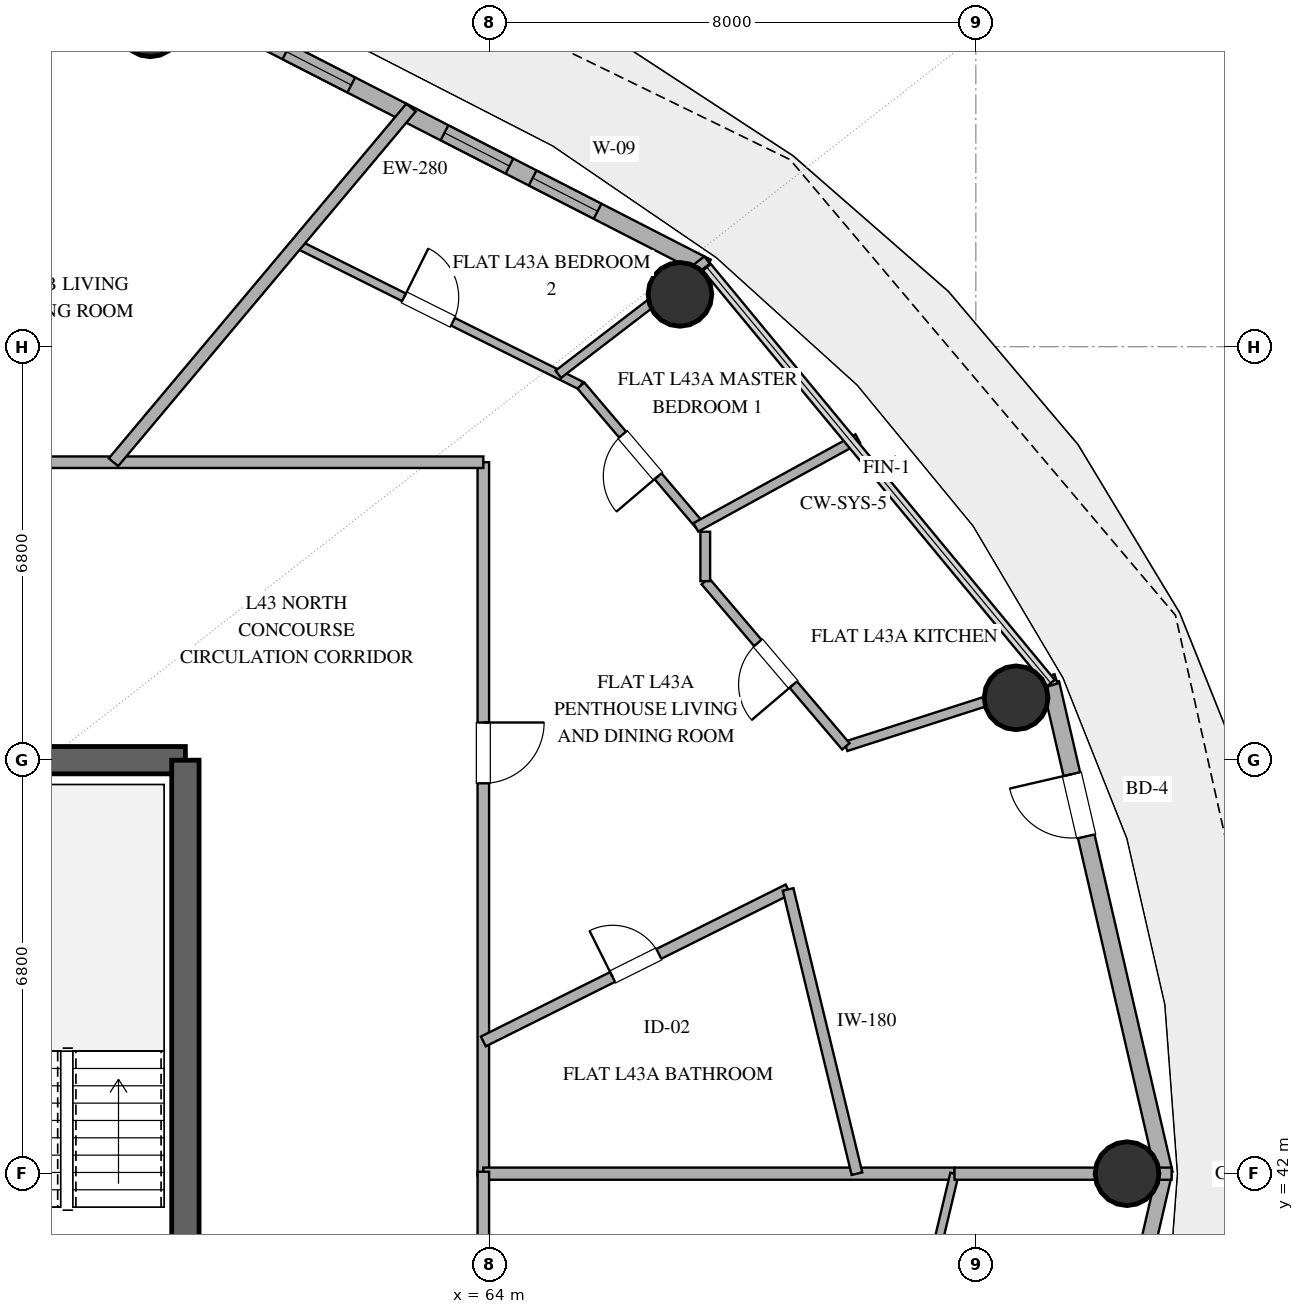
"""IFC4 building model, lengths in metres.
Left out: names, types, materials, properties, quantities, classifications, styles, units other than length and angle.
Written with IfcOpenShell. Run it as: python <this file> out.ifc"""

import sys

from ifc_helpers import new_model, si_unit, direction, frame, frame_2d, origin, origin_2d, place, context, subcontext, project, spatial, rectangle, hollow_circle, extrude, element, fill, save


model = new_model("IFC4")
c1 = context("Model", 3, precision=1e-05, world=origin(), true_north=direction((0.0, 1.0)))
c2 = subcontext(c1, "Body", "Model", "MODEL_VIEW")
j1 = project(units=[si_unit("LENGTHUNIT", "METRE"), si_unit("PLANEANGLEUNIT", "RADIAN")], contexts=[c1])
p1 = place(None, origin())
s1 = spatial("IfcSite", under=j1, at=p1, CompositionType="ELEMENT")
p2 = place(p1, origin())
s2 = spatial("IfcBuilding", under=s1, at=p2, CompositionType="ELEMENT")
p3 = place(p2, frame((0.0, 0.0, 172.2)))
s3 = spatial("IfcBuildingStorey", under=s2, at=p3, CompositionType="ELEMENT", Elevation=172.2)
p4 = place(p3, frame((55.0, 48.8, 0.0), z_axis=(0.0, 0.0, 1.0), x_axis=(1.0, 0.0, 0.0)))
e1 = element("IfcWall", 1, at=p4, inside=s3, PredefinedType="SHEAR", context=c2, shape_type="SweptSolid", body=[
    extrude(rectangle(XDim=4.0, YDim=0.45, at=frame_2d((2.0, 0.0))), origin(), (0.0, 0.0, 1.0), 3.38),
])
p5 = place(p3, frame((59.0, 35.2, 0.0), z_axis=(0.0, 0.0, 1.0), x_axis=(0.0, 1.0, 0.0)))
e2 = element("IfcWall", 2, at=p5, inside=s3, PredefinedType="SHEAR", context=c2, shape_type="SweptSolid", body=[
    extrude(rectangle(XDim=13.6, YDim=0.45, at=frame_2d((6.8, 0.0))), origin(), (0.0, 0.0, 1.0), 3.38),
])
for number, where, z_axis, x_axis in (
    (3, (74.487, 42.0, 0.0), (0.0, 0.0, 1.0), (1.0, 0.0, 0.0)),
    (4, (72.662, 49.826, 0.0), (0.0, 0.0, 1.0), (1.0, 0.0, 0.0)),
    (5, (67.134, 56.46, 0.0), (0.0, 0.0, 1.0), (1.0, 0.0, 0.0)),
    (6, (58.422, 60.893, 0.0), (0.0, 0.0, 1.0), (1.0, 0.0, 0.0)),
):
    element("IfcColumn", number, at=place(p3, frame(where, z_axis=z_axis, x_axis=x_axis)), inside=s3, PredefinedType="COLUMN", context=c2, shape_type="SweptSolid", body=[
        extrude(hollow_circle(Radius=0.525, WallThickness=0.028, at=origin_2d()), origin(), (0.0, 0.0, 1.0), 3.38),
    ])
p6 = place(p3, frame((75.099, 42.0, 0.0), z_axis=(0.0, 0.0, 1.0), x_axis=(-0.225473184558, 0.974249374157, 0.0)))
e7 = element("IfcWall", 7, at=p6, inside=s3, PredefinedType="SOLIDWALL", context=c2, shape_type="SweptSolid", body=[
    extrude(rectangle(XDim=8.28, YDim=0.28, at=frame_2d((4.14, 0.0))), origin(), (0.0, 0.0, 1.0), 3.38),
])
p7 = place(p6, frame((5.694, 0.0, 0.0)))
e8 = element("IfcOpeningElement", 8, at=p7, cuts=e7, PredefinedType="OPENING", context=c2, shape_type="SweptSolid", body=[
    extrude(rectangle(XDim=1.05, YDim=2.2, at=frame_2d((0.525, 1.1))), frame((0.0, 0.15, 0.0), z_axis=(0.0, -1.0, 0.0), x_axis=(1.0, 0.0, 0.0)), (0.0, 0.0, 1.0), 0.3),
])
p8 = place(p3, frame((67.576, 56.906, 0.0), z_axis=(0.0, 0.0, 1.0), x_axis=(-0.889872523182, 0.456209263919, 0.0)))
e9 = element("IfcWall", 9, at=p8, inside=s3, PredefinedType="SOLIDWALL", context=c2, shape_type="SweptSolid", body=[
    extrude(rectangle(XDim=10.016, YDim=0.28, at=frame_2d((5.008, 0.0))), origin(), (0.0, 0.0, 1.0), 3.38),
])
p9 = place(p8, frame((2.019, 0.0, 0.85)))
e10 = element("IfcOpeningElement", 10, at=p9, cuts=e9, PredefinedType="OPENING", context=c2, shape_type="SweptSolid", body=[
    extrude(rectangle(XDim=1.2, YDim=1.8, at=frame_2d((0.6, 0.9))), frame((0.0, 0.15, 0.0), z_axis=(0.0, -1.0, 0.0), x_axis=(1.0, 0.0, 0.0)), (0.0, 0.0, 1.0), 0.3),
])
p10 = place(p8, frame((3.648, 0.0, 0.85)))
e11 = element("IfcOpeningElement", 11, at=p10, cuts=e9, PredefinedType="OPENING", context=c2, shape_type="SweptSolid", body=[
    extrude(rectangle(XDim=1.2, YDim=1.8, at=frame_2d((0.6, 0.9))), frame((0.0, 0.15, 0.0), z_axis=(0.0, -1.0, 0.0), x_axis=(1.0, 0.0, 0.0)), (0.0, 0.0, 1.0), 0.3),
])
p11 = place(p8, frame((6.571, 0.0, 0.85)))
e12 = element("IfcOpeningElement", 12, at=p11, cuts=e9, PredefinedType="OPENING", context=c2, shape_type="SweptSolid", body=[
    extrude(rectangle(XDim=1.2, YDim=1.6, at=frame_2d((0.6, 0.8))), frame((0.0, 0.15, 0.0), z_axis=(0.0, -1.0, 0.0), x_axis=(1.0, 0.0, 0.0)), (0.0, 0.0, 1.0), 0.3),
])
p12 = place(p3, frame((73.232, 33.933, 0.0), z_axis=(0.0, 0.0, 1.0), x_axis=(0.225473184558, 0.974249374157, 0.0)))
e13 = element("IfcWall", 13, at=p12, inside=s3, PredefinedType="SOLIDWALL", context=c2, shape_type="SweptSolid", body=[
    extrude(rectangle(XDim=8.28, YDim=0.25, at=frame_2d((4.14, 0.0))), origin(), (0.0, 0.0, 1.0), 3.38),
])
p13 = place(p12, frame((5.481, 0.0, 1.42)))
e14 = element("IfcOpeningElement", 14, at=p13, cuts=e13, PredefinedType="OPENING", context=c2, shape_type="SweptSolid", body=[
    extrude(rectangle(XDim=1.0, YDim=1.05, at=frame_2d((0.5, 0.525))), frame((0.0, 0.135, 0.0), z_axis=(0.0, -1.0, 0.0), x_axis=(1.0, 0.0, 0.0)), (0.0, 0.0, 1.0), 0.27),
])
p14 = place(p3, frame((63.9, 53.7, 0.0), z_axis=(0.0, 0.0, 1.0), x_axis=(0.0, -1.0, 0.0)))
e15 = element("IfcWall", 15, at=p14, inside=s3, PredefinedType="PARTITIONING", context=c2, shape_type="SweptSolid", body=[
    extrude(rectangle(XDim=11.732, YDim=0.19, at=frame_2d((5.866, 0.0))), origin(), (0.0, 0.0, 1.0), 2.74),
])
p15 = place(p14, frame((4.281, 0.0, 0.0)))
e16 = element("IfcOpeningElement", 16, at=p15, cuts=e15, PredefinedType="OPENING", context=c2, shape_type="SweptSolid", body=[
    extrude(rectangle(XDim=1.0, YDim=2.2, at=frame_2d((0.5, 1.1))), frame((0.0, 0.105, 0.0), z_axis=(0.0, -1.0, 0.0), x_axis=(1.0, 0.0, 0.0)), (0.0, 0.0, 1.0), 0.21),
])
p16 = place(p3, frame((48.092, 53.7, 0.0), z_axis=(0.0, 0.0, 1.0), x_axis=(1.0, 0.0, 0.0)))
e17 = element("IfcWall", 17, at=p16, inside=s3, PredefinedType="PARTITIONING", context=c2, shape_type="SweptSolid", body=[
    extrude(rectangle(XDim=15.808, YDim=0.19, at=frame_2d((7.904, 0.0))), origin(), (0.0, 0.0, 1.0), 2.74),
])
p17 = place(p16, frame((6.109, 0.0, 0.0)))
e18 = element("IfcOpeningElement", 18, at=p17, cuts=e17, PredefinedType="OPENING", context=c2, shape_type="SweptSolid", body=[
    extrude(rectangle(XDim=1.0, YDim=2.2, at=frame_2d((0.5, 1.1))), frame((0.0, 0.105, 0.0), z_axis=(0.0, -1.0, 0.0), x_axis=(1.0, 0.0, 0.0)), (0.0, 0.0, 1.0), 0.21),
])
p18 = place(p3, frame((63.9, 42.0, 0.0), z_axis=(0.0, 0.0, 1.0), x_axis=(1.0, 0.0, 0.0)))
e19 = element("IfcWall", 19, at=p18, inside=s3, PredefinedType="PARTITIONING", context=c2, shape_type="SweptSolid", body=[
    extrude(rectangle(XDim=7.749, YDim=0.2, at=frame_2d((3.875, 0.0))), origin(), (0.0, 0.0, 1.0), 2.74),
])
p19 = place(p3, frame((63.9, 42.032, 0.0), z_axis=(0.0, 0.0, 1.0), x_axis=(0.0, -1.0, 0.0)))
e20 = element("IfcWall", 20, at=p19, inside=s3, PredefinedType="PARTITIONING", context=c2, shape_type="SweptSolid", body=[
    extrude(rectangle(XDim=11.732, YDim=0.19, at=frame_2d((5.866, 0.0))), origin(), (0.0, 0.0, 1.0), 2.74),
])
p20 = place(p3, frame((71.649, 42.0, 0.0), z_axis=(0.0, 0.0, 1.0), x_axis=(-0.231658068135, -0.972797275627, 0.0)))
e21 = element("IfcWall", 21, at=p20, inside=s3, PredefinedType="PARTITIONING", context=c2, shape_type="SweptSolid", body=[
    extrude(rectangle(XDim=7.034, YDim=0.14, at=frame_2d((3.517, 0.0))), origin(), (0.0, 0.0, 1.0), 2.74),
])
p21 = place(p20, frame((2.427, 0.0, 0.0)))
e22 = element("IfcOpeningElement", 22, at=p21, cuts=e21, PredefinedType="OPENING", context=c2, shape_type="SweptSolid", body=[
    extrude(rectangle(XDim=0.9, YDim=2.1, at=frame_2d((0.45, 1.05))), frame((0.0, 0.08, 0.0), z_axis=(0.0, -1.0, 0.0), x_axis=(1.0, 0.0, 0.0)), (0.0, 0.0, 1.0), 0.16),
])
p22 = place(p3, frame((63.9, 44.175, 0.0), z_axis=(0.0, 0.0, 1.0), x_axis=(0.894853920946, 0.446359115699, 0.0)))
e23 = element("IfcWall", 23, at=p22, inside=s3, PredefinedType="PLUMBINGWALL", context=c2, shape_type="SweptSolid", body=[
    extrude(rectangle(XDim=5.601, YDim=0.18, at=frame_2d((2.801, 0.0))), origin(), (0.0, 0.0, 1.0), 2.74),
])
p23 = place(p22, frame((2.375, 0.0, 0.0)))
e24 = element("IfcOpeningElement", 24, at=p23, cuts=e23, PredefinedType="OPENING", context=c2, shape_type="SweptSolid", body=[
    extrude(rectangle(XDim=0.85, YDim=2.1, at=frame_2d((0.425, 1.05))), frame((0.0, 0.1, 0.0), z_axis=(0.0, -1.0, 0.0), x_axis=(1.0, 0.0, 0.0)), (0.0, 0.0, 1.0), 0.2),
])
p24 = place(p3, frame((60.831, 57.291, 0.0), z_axis=(0.0, 0.0, 1.0), x_axis=(0.894950159382, -0.446166126261, 0.0)))
e25 = element("IfcWall", 25, at=p24, inside=s3, PredefinedType="PARTITIONING", context=c2, shape_type="SweptSolid", body=[
    extrude(rectangle(XDim=5.222, YDim=0.14, at=frame_2d((2.611, 0.0))), origin(), (0.0, 0.0, 1.0), 2.74),
])
p25 = place(p24, frame((1.971, 0.0, 0.0)))
e26 = element("IfcOpeningElement", 26, at=p25, cuts=e25, PredefinedType="OPENING", context=c2, shape_type="SweptSolid", body=[
    extrude(rectangle(XDim=0.9, YDim=2.1, at=frame_2d((0.45, 1.05))), frame((0.0, 0.08, 0.0), z_axis=(0.0, -1.0, 0.0), x_axis=(1.0, 0.0, 0.0)), (0.0, 0.0, 1.0), 0.16),
])
p26 = place(p3, frame((68.912, 46.675, 0.0), z_axis=(0.0, 0.0, 1.0), x_axis=(0.235459111302, -0.97188425592, 0.0)))
e27 = element("IfcWall", 27, at=p26, inside=s3, PredefinedType="PLUMBINGWALL", context=c2, shape_type="SweptSolid", body=[
    extrude(rectangle(XDim=4.81, YDim=0.18, at=frame_2d((2.405, 0.0))), origin(), (0.0, 0.0, 1.0), 2.74),
])
p27 = place(p3, frame((62.711, 59.531, 0.0), z_axis=(0.0, 0.0, 1.0), x_axis=(-0.642792619699, -0.766040239192, 0.0)))
e28 = element("IfcWall", 28, at=p27, inside=s3, PredefinedType="PARTITIONING", context=c2, shape_type="SweptSolid", body=[
    extrude(rectangle(XDim=7.613, YDim=0.2, at=frame_2d((3.806, 0.0))), origin(), (0.0, 0.0, 1.0), 2.74),
])
p28 = place(p3, frame((73.318, 50.138, 0.0), z_axis=(0.0, 0.0, 1.0), x_axis=(-0.95200546613, -0.306081022703, 0.0)))
e29 = element("IfcWall", 29, at=p28, inside=s3, PredefinedType="PLUMBINGWALL", context=c2, shape_type="SweptSolid", body=[
    extrude(rectangle(XDim=3.63, YDim=0.16, at=frame_2d((1.815, 0.0))), origin(), (0.0, 0.0, 1.0), 2.74),
])
p29 = place(p3, frame((71.649, 42.0, 0.0), z_axis=(0.0, 0.0, 1.0), x_axis=(1.0, 0.0, 0.0)))
e30 = element("IfcWall", 30, at=p29, inside=s3, PredefinedType="PARTITIONING", context=c2, shape_type="SweptSolid", body=[
    extrude(rectangle(XDim=3.571, YDim=0.2, at=frame_2d((1.785, 0.0))), origin(), (0.0, 0.0, 1.0), 2.74),
])
p30 = place(p3, frame((69.862, 49.027, 0.0), z_axis=(0.0, 0.0, 1.0), x_axis=(-0.648065435441, 0.761584658057, 0.0)))
e31 = element("IfcWall", 31, at=p30, inside=s3, PredefinedType="PLUMBINGWALL", context=c2, shape_type="SweptSolid", body=[
    extrude(rectangle(XDim=3.568, YDim=0.16, at=frame_2d((1.784, 0.0))), origin(), (0.0, 0.0, 1.0), 2.74),
])
p31 = place(p30, frame((1.334, 0.0, 0.0)))
e32 = element("IfcOpeningElement", 32, at=p31, cuts=e31, PredefinedType="OPENING", context=c2, shape_type="SweptSolid", body=[
    extrude(rectangle(XDim=0.9, YDim=2.1, at=frame_2d((0.45, 1.05))), frame((0.0, 0.09, 0.0), z_axis=(0.0, -1.0, 0.0), x_axis=(1.0, 0.0, 0.0)), (0.0, 0.0, 1.0), 0.18),
])
p32 = place(p3, frame((67.581, 57.025, 0.0), z_axis=(0.0, 0.0, 1.0), x_axis=(-0.793314658032, -0.608811837395, 0.0)))
e33 = element("IfcWall", 33, at=p32, inside=s3, PredefinedType="PARTITIONING", context=c2, shape_type="SweptSolid", body=[
    extrude(rectangle(XDim=3.086, YDim=0.15, at=frame_2d((1.543, 0.0))), origin(), (0.0, 0.0, 1.0), 2.74),
])
p33 = place(p3, frame((67.459, 52.664, 0.0), z_axis=(0.0, 0.0, 1.0), x_axis=(-0.647859881114, 0.761759525338, 0.0)))
e34 = element("IfcWall", 34, at=p33, inside=s3, PredefinedType="PARTITIONING", context=c2, shape_type="SweptSolid", body=[
    extrude(rectangle(XDim=3.016, YDim=0.15, at=frame_2d((1.508, 0.0))), origin(), (0.0, 0.0, 1.0), 2.74),
])
p34 = place(p33, frame((1.058, 0.0, 0.0)))
e35 = element("IfcOpeningElement", 35, at=p34, cuts=e34, PredefinedType="OPENING", context=c2, shape_type="SweptSolid", body=[
    extrude(rectangle(XDim=0.9, YDim=2.1, at=frame_2d((0.45, 1.05))), frame((0.0, 0.085, 0.0), z_axis=(0.0, -1.0, 0.0), x_axis=(1.0, 0.0, 0.0)), (0.0, 0.0, 1.0), 0.17),
])
p35 = place(p3, frame((67.396, 52.629, 0.0), z_axis=(0.0, 0.0, 1.0), x_axis=(0.876959960956, 0.4805634473, 0.0)))
e36 = element("IfcWall", 36, at=p35, inside=s3, PredefinedType="PLUMBINGWALL", context=c2, shape_type="SweptSolid", body=[
    extrude(rectangle(XDim=3.037, YDim=0.16, at=frame_2d((1.519, 0.0))), origin(), (0.0, 0.0, 1.0), 2.74),
])
p36 = place(p3, frame((67.55, 51.744, 0.0), z_axis=(0.0, 0.0, 1.0), x_axis=(0.0, 1.0, 0.0)))
e37 = element("IfcWall", 37, at=p36, inside=s3, PredefinedType="PLUMBINGWALL", context=c2, shape_type="SweptSolid", body=[
    extrude(rectangle(XDim=0.812, YDim=0.16, at=frame_2d((0.406, 0.0))), origin(), (0.0, 0.0, 1.0), 2.74),
])
p37 = place(p7, origin())
e38 = element("IfcDoor", 38, at=p37, inside=s3, OperationType="SINGLE_SWING_RIGHT", PredefinedType="DOOR", context=c2, shape_type="SweptSolid", body=[
    extrude(rectangle(XDim=1.05, YDim=2.2, at=frame_2d((0.525, 1.1))), frame((0.0, 0.025, 0.0), z_axis=(0.0, -1.0, 0.0), x_axis=(1.0, 0.0, 0.0)), (0.0, 0.0, 1.0), 0.05),
])
fill(e8, e38)
p38 = place(p9, origin())
e39 = element("IfcWindow", 39, at=p38, inside=s3, PartitioningType="SINGLE_PANEL", PredefinedType="WINDOW", context=c2, shape_type="SweptSolid", body=[
    extrude(rectangle(XDim=1.2, YDim=1.8, at=frame_2d((0.6, 0.9))), frame((0.0, 0.03, 0.0), z_axis=(0.0, -1.0, 0.0), x_axis=(1.0, 0.0, 0.0)), (0.0, 0.0, 1.0), 0.06),
])
fill(e10, e39)
p39 = place(p10, origin())
e40 = element("IfcWindow", 40, at=p39, inside=s3, PartitioningType="SINGLE_PANEL", PredefinedType="WINDOW", context=c2, shape_type="SweptSolid", body=[
    extrude(rectangle(XDim=1.2, YDim=1.8, at=frame_2d((0.6, 0.9))), frame((0.0, 0.03, 0.0), z_axis=(0.0, -1.0, 0.0), x_axis=(1.0, 0.0, 0.0)), (0.0, 0.0, 1.0), 0.06),
])
fill(e11, e40)
p40 = place(p11, origin())
e41 = element("IfcWindow", 41, at=p40, inside=s3, PartitioningType="SINGLE_PANEL", PredefinedType="WINDOW", context=c2, shape_type="SweptSolid", body=[
    extrude(rectangle(XDim=1.2, YDim=1.6, at=frame_2d((0.6, 0.8))), frame((0.0, 0.03, 0.0), z_axis=(0.0, -1.0, 0.0), x_axis=(1.0, 0.0, 0.0)), (0.0, 0.0, 1.0), 0.06),
])
fill(e12, e41)
p41 = place(p15, origin())
e42 = element("IfcDoor", 42, at=p41, inside=s3, OperationType="SINGLE_SWING_LEFT", PredefinedType="DOOR", context=c2, shape_type="SweptSolid", body=[
    extrude(rectangle(XDim=1.0, YDim=2.2, at=frame_2d((0.5, 1.1))), frame((0.0, 0.025, 0.0), z_axis=(0.0, -1.0, 0.0), x_axis=(1.0, 0.0, 0.0)), (0.0, 0.0, 1.0), 0.05),
])
fill(e16, e42)
p42 = place(p23, origin())
e43 = element("IfcDoor", 43, at=p42, inside=s3, OperationType="SINGLE_SWING_LEFT", PredefinedType="DOOR", context=c2, shape_type="SweptSolid", body=[
    extrude(rectangle(XDim=0.85, YDim=2.1, at=frame_2d((0.425, 1.05))), frame((0.0, 0.025, 0.0), z_axis=(0.0, -1.0, 0.0), x_axis=(1.0, 0.0, 0.0)), (0.0, 0.0, 1.0), 0.05),
])
fill(e24, e43)
p43 = place(p25, origin())
e44 = element("IfcDoor", 44, at=p43, inside=s3, OperationType="SINGLE_SWING_LEFT", PredefinedType="DOOR", context=c2, shape_type="SweptSolid", body=[
    extrude(rectangle(XDim=0.9, YDim=2.1, at=frame_2d((0.45, 1.05))), frame((0.0, 0.025, 0.0), z_axis=(0.0, -1.0, 0.0), x_axis=(1.0, 0.0, 0.0)), (0.0, 0.0, 1.0), 0.05),
])
fill(e26, e44)
p44 = place(p31, origin())
e45 = element("IfcDoor", 45, at=p44, inside=s3, OperationType="SINGLE_SWING_LEFT", PredefinedType="DOOR", context=c2, shape_type="SweptSolid", body=[
    extrude(rectangle(XDim=0.9, YDim=2.1, at=frame_2d((0.45, 1.05))), frame((0.0, 0.025, 0.0), z_axis=(0.0, -1.0, 0.0), x_axis=(1.0, 0.0, 0.0)), (0.0, 0.0, 1.0), 0.05),
])
fill(e32, e45)
p45 = place(p34, origin())
e46 = element("IfcDoor", 46, at=p45, inside=s3, OperationType="SINGLE_SWING_LEFT", PredefinedType="DOOR", context=c2, shape_type="SweptSolid", body=[
    extrude(rectangle(XDim=0.9, YDim=2.1, at=frame_2d((0.45, 1.05))), frame((0.0, 0.025, 0.0), z_axis=(0.0, -1.0, 0.0), x_axis=(1.0, 0.0, 0.0)), (0.0, 0.0, 1.0), 0.05),
])
fill(e35, e46)
save(model, sys.argv[1])
